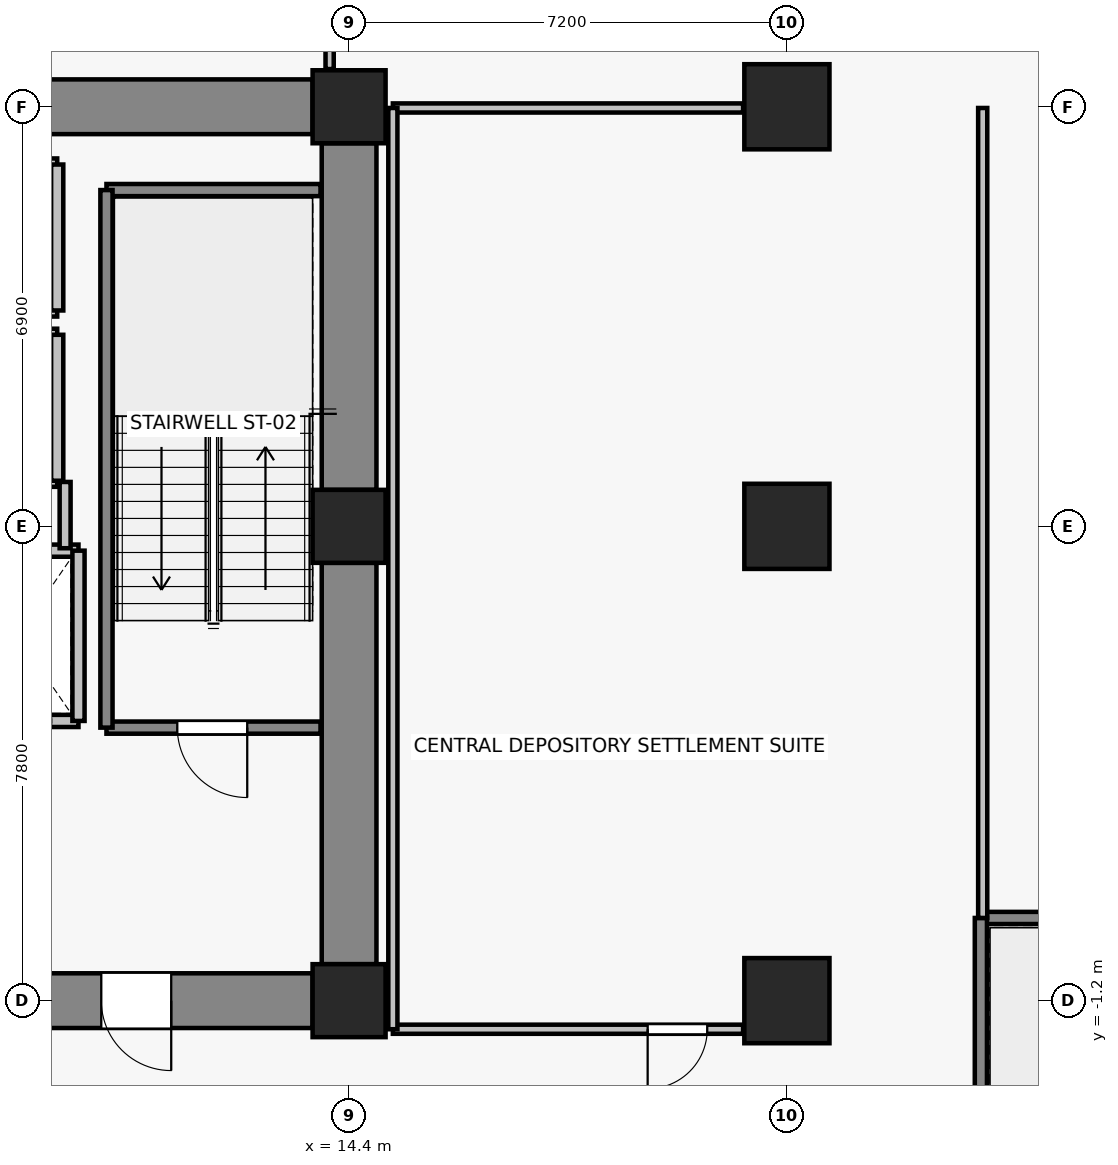
"""IFC4 building model, lengths in metres.
Left out: names, types, materials, properties, quantities, classifications, styles, units other than length and angle.
Written with IfcOpenShell. Run it as: python <this file> out.ifc"""

import sys

from ifc_helpers import new_model, si_unit, direction, frame, frame_2d, origin, origin_2d, place, context, subcontext, project, spatial, rectangle, extrude, source, transform, mapped, element, fill, save


model = new_model("IFC4")
c1 = context("Model", 3, precision=1e-05, world=origin(), true_north=direction((0.0, 1.0)))
c2 = subcontext(c1, "Body", "Model", "MODEL_VIEW")
j1 = project(units=[si_unit("LENGTHUNIT", "METRE"), si_unit("PLANEANGLEUNIT", "RADIAN")], contexts=[c1])
p1 = place(None, origin())
s1 = spatial("IfcSite", under=j1, at=p1, CompositionType="ELEMENT")
p2 = place(p1, origin())
s2 = spatial("IfcBuilding", under=s1, at=p2, CompositionType="ELEMENT")
p3 = place(p2, frame((0.0, 0.0, 18.2)))
s3 = spatial("IfcBuildingStorey", under=s2, at=p3, CompositionType="ELEMENT", Elevation=18.2)
for number, where, z_axis, x_axis in (
    (1, (14.4, -1.2, 0.0), (0.0, 0.0, 1.0), (1.0, 0.0, 0.0)),
    (2, (14.4, 6.6, 0.0), (0.0, 0.0, 1.0), (1.0, 0.0, 0.0)),
    (3, (14.4, 13.5, 0.0), (0.0, 0.0, 1.0), (1.0, 0.0, 0.0)),
):
    element("IfcColumn", number, at=place(p3, frame(where, z_axis=z_axis, x_axis=x_axis)), inside=s3, PredefinedType="COLUMN", context=c2, shape_type="SweptSolid", body=[
        extrude(rectangle(XDim=1.2, YDim=1.2, at=origin_2d()), origin(), (0.0, 0.0, 1.0), 4.4),
    ])
for number, where, z_axis, x_axis in (
    (4, (21.6, -1.2, 0.0), (0.0, 0.0, 1.0), (1.0, 0.0, 0.0)),
    (5, (21.6, 6.6, 0.0), (0.0, 0.0, 1.0), (1.0, 0.0, 0.0)),
    (6, (21.6, 13.5, 0.0), (0.0, 0.0, 1.0), (1.0, 0.0, 0.0)),
):
    element("IfcColumn", number, at=place(p3, frame(where, z_axis=z_axis, x_axis=x_axis)), inside=s3, PredefinedType="COLUMN", context=c2, shape_type="SweptSolid", body=[
        extrude(rectangle(XDim=1.4, YDim=1.4, at=origin_2d()), origin(), (0.0, 0.0, 1.0), 4.4),
    ])
p4 = place(p3, frame((7.8, 13.5, 0.0), z_axis=(0.0, 0.0, 1.0), x_axis=(1.0, 0.0, 0.0)))
e7 = element("IfcWall", 7, at=p4, inside=s3, PredefinedType="SHEAR", context=c2, shape_type="SweptSolid", body=[
    extrude(rectangle(XDim=6.0, YDim=0.9, at=frame_2d((3.0, 0.0))), origin(), (0.0, 0.0, 1.0), 4.1),
])
p5 = place(p3, frame((14.4, -0.6, 0.0), z_axis=(0.0, 0.0, 1.0), x_axis=(0.0, 1.0, 0.0)))
e8 = element("IfcWall", 8, at=p5, inside=s3, PredefinedType="SHEAR", context=c2, shape_type="SweptSolid", body=[
    extrude(rectangle(XDim=6.6, YDim=0.9, at=frame_2d((3.3, 0.0))), origin(), (0.0, 0.0, 1.0), 4.1),
])
p6 = place(p3, frame((14.4, 7.2, 0.0), z_axis=(0.0, 0.0, 1.0), x_axis=(0.0, 1.0, 0.0)))
e9 = element("IfcWall", 9, at=p6, inside=s3, PredefinedType="SHEAR", context=c2, shape_type="SweptSolid", body=[
    extrude(rectangle(XDim=5.7, YDim=0.9, at=frame_2d((2.85, 0.0))), origin(), (0.0, 0.0, 1.0), 4.1),
])
p7 = place(p3, frame((13.8, -1.2, 0.0), z_axis=(0.0, 0.0, 1.0), x_axis=(-1.0, 0.0, 0.0)))
e10 = element("IfcWall", 10, at=p7, inside=s3, PredefinedType="SHEAR", context=c2, shape_type="SweptSolid", body=[
    extrude(rectangle(XDim=6.0, YDim=0.9, at=frame_2d((3.0, 0.0))), origin(), (0.0, 0.0, 1.0), 4.1),
])
p8 = place(p7, frame((2.325, 0.0, 0.0)))
e11 = element("IfcOpeningElement", 11, at=p8, cuts=e10, PredefinedType="OPENING", context=c2, shape_type="SweptSolid", body=[
    extrude(rectangle(XDim=1.15, YDim=2.15, at=frame_2d((0.575, 1.075))), frame((0.0, 0.46, 0.0), z_axis=(0.0, -1.0, 0.0), x_axis=(1.0, 0.0, 0.0)), (0.0, 0.0, 1.0), 0.92),
])
p9 = place(p3, frame((9.95, 3.4, 0.0), z_axis=(0.0, 0.0, 1.0), x_axis=(-1.0, 0.0, 0.0)))
e12 = element("IfcWall", 12, at=p9, inside=s3, PredefinedType="SOLIDWALL", context=c2, shape_type="SweptSolid", body=[
    extrude(rectangle(XDim=2.0, YDim=0.2, at=frame_2d((1.0, 0.0))), origin(), (0.0, 0.0, 1.0), 4.1),
])
p10 = place(p9, frame((0.45, 0.0, 0.0)))
e13 = element("IfcOpeningElement", 13, at=p10, cuts=e12, PredefinedType="OPENING", context=c2, shape_type="SweptSolid", body=[
    extrude(rectangle(XDim=1.1, YDim=2.2, at=frame_2d((0.55, 1.1))), frame((0.0, 0.11, 0.0), z_axis=(0.0, -1.0, 0.0), x_axis=(1.0, 0.0, 0.0)), (0.0, 0.0, 1.0), 0.22),
])
p11 = place(p3, frame((7.95, 6.2, 0.0), z_axis=(0.0, 0.0, 1.0), x_axis=(1.0, 0.0, 0.0)))
e14 = element("IfcWall", 14, at=p11, inside=s3, PredefinedType="SOLIDWALL", context=c2, shape_type="SweptSolid", body=[
    extrude(rectangle(XDim=2.0, YDim=0.2, at=frame_2d((1.0, 0.0))), origin(), (0.0, 0.0, 1.0), 4.1),
])
p12 = place(p3, frame((9.95, 6.2, 0.0), z_axis=(0.0, 0.0, 1.0), x_axis=(0.0, -1.0, 0.0)))
e15 = element("IfcWall", 15, at=p12, inside=s3, PredefinedType="SOLIDWALL", context=c2, shape_type="SweptSolid", body=[
    extrude(rectangle(XDim=2.8, YDim=0.2, at=frame_2d((1.4, 0.0))), origin(), (0.0, 0.0, 1.0), 4.1),
])
for number, where, z_axis, x_axis in (
    (16, (9.6, 7.35, 0.0), (0.0, 0.0, 1.0), (-1.0, 0.0, 0.0)),
    (17, (7.4, 9.75, 0.0), (0.0, 0.0, 1.0), (1.0, 0.0, 0.0)),
):
    element("IfcWall", number, at=place(p3, frame(where, z_axis=z_axis, x_axis=x_axis)), inside=s3, PredefinedType="SOLIDWALL", context=c2, shape_type="SweptSolid", body=[
        extrude(rectangle(XDim=2.2, YDim=0.2, at=frame_2d((1.1, 0.0))), origin(), (0.0, 0.0, 1.0), 3.19),
    ])
p13 = place(p3, frame((9.6, 9.75, 0.0), z_axis=(0.0, 0.0, 1.0), x_axis=(0.0, -1.0, 0.0)))
e18 = element("IfcWall", 18, at=p13, inside=s3, PredefinedType="SOLIDWALL", context=c2, shape_type="SweptSolid", body=[
    extrude(rectangle(XDim=2.4, YDim=0.2, at=frame_2d((1.2, 0.0))), origin(), (0.0, 0.0, 1.0), 4.1),
])
for number, where, z_axis, x_axis in (
    (19, (9.6, 10.15, 0.0), (0.0, 0.0, 1.0), (-1.0, 0.0, 0.0)),
    (20, (7.4, 12.55, 0.0), (0.0, 0.0, 1.0), (1.0, 0.0, 0.0)),
):
    element("IfcWall", number, at=place(p3, frame(where, z_axis=z_axis, x_axis=x_axis)), inside=s3, PredefinedType="SOLIDWALL", context=c2, shape_type="SweptSolid", body=[
        extrude(rectangle(XDim=2.2, YDim=0.2, at=frame_2d((1.1, 0.0))), origin(), (0.0, 0.0, 1.0), 3.19),
    ])
p14 = place(p3, frame((9.6, 12.55, 0.0), z_axis=(0.0, 0.0, 1.0), x_axis=(0.0, -1.0, 0.0)))
e21 = element("IfcWall", 21, at=p14, inside=s3, PredefinedType="SOLIDWALL", context=c2, shape_type="SweptSolid", body=[
    extrude(rectangle(XDim=2.4, YDim=0.2, at=frame_2d((1.2, 0.0))), origin(), (0.0, 0.0, 1.0), 4.1),
])
p15 = place(p3, frame((13.93, 3.29, 0.0), z_axis=(0.0, 0.0, 1.0), x_axis=(-1.0, 0.0, 0.0)))
e22 = element("IfcWall", 22, at=p15, inside=s3, PredefinedType="SOLIDWALL", context=c2, shape_type="SweptSolid", body=[
    extrude(rectangle(XDim=3.52, YDim=0.2, at=frame_2d((1.76, 0.0))), origin(), (0.0, 0.0, 1.0), 4.1),
])
p16 = place(p15, frame((1.205, 0.0, 0.0)))
e23 = element("IfcOpeningElement", 23, at=p16, cuts=e22, PredefinedType="OPENING", context=c2, shape_type="SweptSolid", body=[
    extrude(rectangle(XDim=1.15, YDim=2.15, at=frame_2d((0.575, 1.075))), frame((0.0, 0.11, 0.0), z_axis=(0.0, -1.0, 0.0), x_axis=(1.0, 0.0, 0.0)), (0.0, 0.0, 1.0), 0.22),
])
p17 = place(p3, frame((10.41, 12.13, 0.0), z_axis=(0.0, 0.0, 1.0), x_axis=(1.0, 0.0, 0.0)))
e24 = element("IfcWall", 24, at=p17, inside=s3, PredefinedType="SOLIDWALL", context=c2, shape_type="SweptSolid", body=[
    extrude(rectangle(XDim=3.52, YDim=0.2, at=frame_2d((1.76, 0.0))), origin(), (0.0, 0.0, 1.0), 4.1),
])
p18 = place(p3, frame((10.41, 3.29, 0.0), z_axis=(0.0, 0.0, 1.0), x_axis=(0.0, 1.0, 0.0)))
e25 = element("IfcWall", 25, at=p18, inside=s3, PredefinedType="SOLIDWALL", context=c2, shape_type="SweptSolid", body=[
    extrude(rectangle(XDim=8.84, YDim=0.2, at=frame_2d((4.42, 0.0))), origin(), (0.0, 0.0, 1.0), 4.1),
])
p19 = place(p3, frame((9.73, 7.33, 0.0), z_axis=(0.0, 0.0, 1.0), x_axis=(0.0, -1.0, 0.0)))
e26 = element("IfcWall", 26, at=p19, inside=s3, PredefinedType="PARTITIONING", context=c2, shape_type="SweptSolid", body=[
    extrude(rectangle(XDim=1.09, YDim=0.18, at=frame_2d((0.545, 0.0))), origin(), (0.0, 0.0, 1.0), 4.1),
])
p20 = place(p3, frame((24.79, 0.16, 0.0), z_axis=(0.0, 0.0, 1.0), x_axis=(1.0, 0.0, 0.0)))
e27 = element("IfcWall", 27, at=p20, inside=s3, PredefinedType="SOLIDWALL", context=c2, shape_type="SweptSolid", body=[
    extrude(rectangle(XDim=3.77, YDim=0.2, at=frame_2d((1.885, 0.0))), origin(), (0.0, 0.0, 1.0), 4.1),
])
p21 = place(p3, frame((24.79, -8.76, 0.0), z_axis=(0.0, 0.0, 1.0), x_axis=(0.0, 1.0, 0.0)))
e28 = element("IfcWall", 28, at=p21, inside=s3, PredefinedType="SOLIDWALL", context=c2, shape_type="SweptSolid", body=[
    extrude(rectangle(XDim=8.92, YDim=0.2, at=frame_2d((4.46, 0.0))), origin(), (0.0, 0.0, 1.0), 4.1),
])
p22 = place(p3, frame((20.88, -1.67, 0.0), z_axis=(0.0, 0.0, 1.0), x_axis=(-1.0, 0.0, 0.0)))
e29 = element("IfcWall", 29, at=p22, inside=s3, PredefinedType="PARTITIONING", context=c2, shape_type="SweptSolid", body=[
    extrude(rectangle(XDim=5.76, YDim=0.15, at=frame_2d((2.88, 0.0))), origin(), (0.0, 0.0, 1.0), 4.1),
])
p23 = place(p22, frame((0.59, 0.0, 0.0)))
e30 = element("IfcOpeningElement", 30, at=p23, cuts=e29, PredefinedType="OPENING", context=c2, shape_type="SweptSolid", body=[
    extrude(rectangle(XDim=0.98, YDim=2.15, at=frame_2d((0.49, 1.075))), frame((0.0, 0.085, 0.0), z_axis=(0.0, -1.0, 0.0), x_axis=(1.0, 0.0, 0.0)), (0.0, 0.0, 1.0), 0.17),
])
p24 = place(p3, frame((15.12, 13.48, 0.0), z_axis=(0.0, 0.0, 1.0), x_axis=(1.0, 0.0, 0.0)))
e31 = element("IfcWall", 31, at=p24, inside=s3, PredefinedType="PARTITIONING", context=c2, shape_type="SweptSolid", body=[
    extrude(rectangle(XDim=5.76, YDim=0.15, at=frame_2d((2.88, 0.0))), origin(), (0.0, 0.0, 1.0), 3.19),
])
p25 = place(p3, frame((15.12, -1.67, 0.0), z_axis=(0.0, 0.0, 1.0), x_axis=(0.0, 1.0, 0.0)))
e32 = element("IfcWall", 32, at=p25, inside=s3, PredefinedType="PARTITIONING", context=c2, shape_type="SweptSolid", body=[
    extrude(rectangle(XDim=15.15, YDim=0.15, at=frame_2d((7.575, 0.0))), origin(), (0.0, 0.0, 1.0), 3.19),
])
p26 = place(p3, frame((24.82, 13.48, 0.0), z_axis=(0.0, 0.0, 1.0), x_axis=(0.0, -1.0, 0.0)))
e33 = element("IfcWall", 33, at=p26, inside=s3, PredefinedType="PARTITIONING", context=c2, shape_type="SweptSolid", body=[
    extrude(rectangle(XDim=13.32, YDim=0.15, at=frame_2d((6.66, 0.0))), origin(), (0.0, 0.0, 1.0), 3.19),
])
p27 = place(p3, frame((14.08, 21.08, 0.0), z_axis=(0.0, 0.0, 1.0), x_axis=(0.0, -1.0, 0.0)))
e34 = element("IfcWall", 34, at=p27, inside=s3, PredefinedType="PARTITIONING", context=c2, shape_type="SweptSolid", body=[
    extrude(rectangle(XDim=6.96, YDim=0.135, at=frame_2d((3.48, 0.0))), origin(), (0.0, 0.0, 1.0), 3.473),
])
m1 = source(origin(), c2, "Body", "SweptSolid", [
    extrude(rectangle(XDim=1.15, YDim=2.15, at=frame_2d((0.575, 1.075))), frame((0.0, 0.025, 0.0), z_axis=(0.0, -1.0, 0.0), x_axis=(1.0, 0.0, 0.0)), (0.0, 0.0, 1.0), 0.05),
])
p28 = place(p16, origin())
e35 = element("IfcDoor", 35, at=p28, inside=s3, OperationType="SINGLE_SWING_LEFT", PredefinedType="DOOR", context=c2, shape_type="MappedRepresentation", body=[
    mapped(m1, transform((0.0, 0.0, 0.0), x_axis=(1.0, 0.0, 0.0), y_axis=(0.0, 1.0, 0.0), z_axis=(0.0, 0.0, 1.0), scale=1.0)),
])
fill(e23, e35)
p29 = place(p8, origin())
e36 = element("IfcDoor", 36, at=p29, inside=s3, OperationType="SINGLE_SWING_LEFT", PredefinedType="DOOR", context=c2, shape_type="MappedRepresentation", body=[
    mapped(m1, transform((0.0, 0.0, 0.0), x_axis=(1.0, 0.0, 0.0), y_axis=(0.0, 1.0, 0.0), z_axis=(0.0, 0.0, 1.0), scale=1.0)),
])
fill(e11, e36)
m2 = source(origin(), c2, "Body", "SweptSolid", [
    extrude(rectangle(XDim=0.98, YDim=2.15, at=frame_2d((0.49, 1.075))), frame((0.0, 0.025, 0.0), z_axis=(0.0, -1.0, 0.0), x_axis=(1.0, 0.0, 0.0)), (0.0, 0.0, 1.0), 0.05),
])
p30 = place(p23, origin())
e37 = element("IfcDoor", 37, at=p30, inside=s3, OperationType="SINGLE_SWING_RIGHT", PredefinedType="DOOR", context=c2, shape_type="MappedRepresentation", body=[
    mapped(m2, transform((0.0, 0.0, 0.0), x_axis=(1.0, 0.0, 0.0), y_axis=(0.0, 1.0, 0.0), z_axis=(0.0, 0.0, 1.0), scale=1.0)),
])
fill(e30, e37)
save(model, sys.argv[1])
